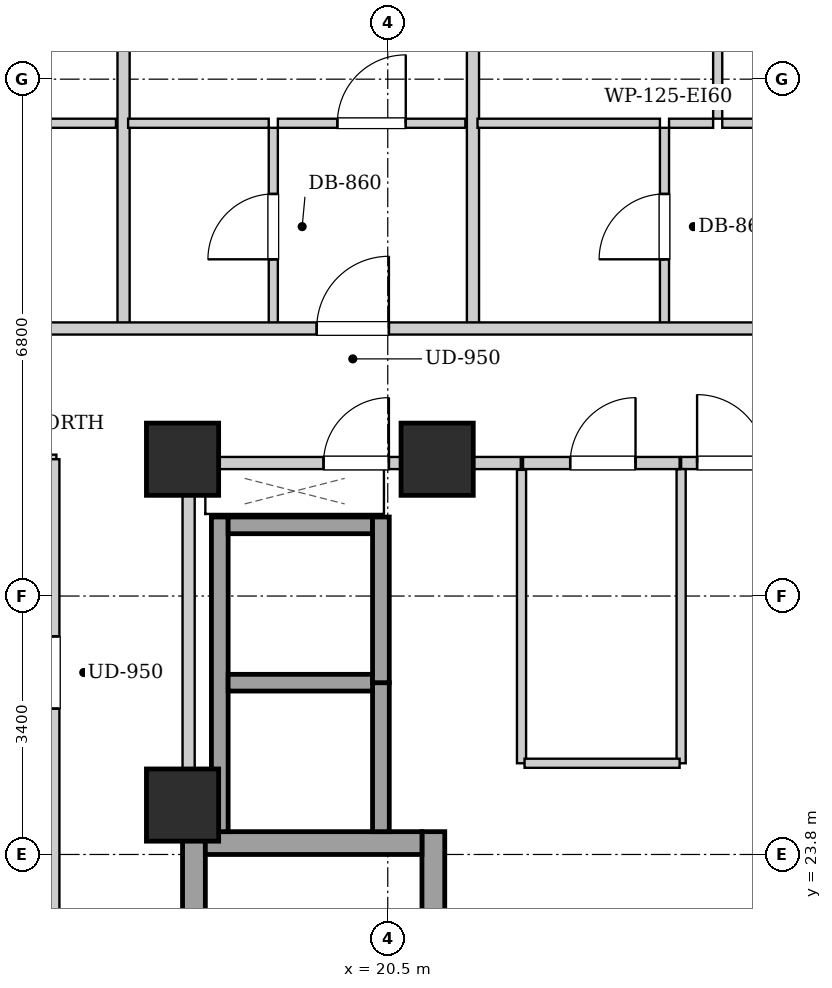
"""IFC4 building model, lengths in metres.
Left out: names, types, materials, properties, quantities, classifications, styles, units other than length and angle.
Written with IfcOpenShell. Run it as: python <this file> out.ifc"""

import sys

from ifc_helpers import new_model, si_unit, direction, frame, frame_2d, origin, origin_2d, place, context, subcontext, project, spatial, rectangle, extrude, element, fill, save


model = new_model("IFC4")
c1 = context("Model", 3, precision=1e-05, world=origin(), true_north=direction((0.0, 1.0)))
c2 = subcontext(c1, "Body", "Model", "MODEL_VIEW")
j1 = project(units=[si_unit("LENGTHUNIT", "METRE"), si_unit("PLANEANGLEUNIT", "RADIAN")], contexts=[c1])
p1 = place(None, origin())
s1 = spatial("IfcSite", under=j1, at=p1, CompositionType="ELEMENT")
p2 = place(p1, origin())
s2 = spatial("IfcBuilding", under=s1, at=p2, CompositionType="ELEMENT")
p3 = place(p2, frame((0.0, 0.0, 147.15)))
s3 = spatial("IfcBuildingStorey", under=s2, at=p3, CompositionType="ELEMENT", Elevation=147.15)
for number, where, z_axis, x_axis in (
    (1, (17.8, 29.0, 0.0), (0.0, 0.0, 1.0), (1.0, 0.0, 0.0)),
    (2, (21.15, 29.0, 0.0), (0.0, 0.0, 1.0), (1.0, 0.0, 0.0)),
    (3, (17.8, 24.45, 0.0), (0.0, 0.0, 1.0), (1.0, 0.0, 0.0)),
):
    element("IfcColumn", number, at=place(p3, frame(where, z_axis=z_axis, x_axis=x_axis)), inside=s3, PredefinedType="COLUMN", context=c2, shape_type="SweptSolid", body=[
        extrude(rectangle(XDim=0.95, YDim=0.95, at=origin_2d()), origin(), (0.0, 0.0, 1.0), 3.25),
    ])
for number, where, z_axis, x_axis in (
    (4, (17.95, 15.1, 0.0), (0.0, 0.0, 1.0), (0.0, 1.0, 0.0)),
    (5, (21.1, 15.1, 0.0), (0.0, 0.0, 1.0), (0.0, 1.0, 0.0)),
):
    element("IfcWall", number, at=place(p3, frame(where, z_axis=z_axis, x_axis=x_axis)), inside=s3, PredefinedType="SHEAR", context=c2, shape_type="SweptSolid", body=[
        extrude(rectangle(XDim=9.0, YDim=0.3, at=frame_2d((4.5, 0.0))), origin(), (0.0, 0.0, 1.0), 2.99),
    ])
p4 = place(p3, frame((18.1, 23.95, 0.0), z_axis=(0.0, 0.0, 1.0), x_axis=(1.0, 0.0, 0.0)))
e6 = element("IfcWall", 6, at=p4, inside=s3, PredefinedType="SHEAR", context=c2, shape_type="SweptSolid", body=[
    extrude(rectangle(XDim=2.85, YDim=0.3, at=frame_2d((1.425, 0.0))), origin(), (0.0, 0.0, 1.0), 2.99),
])
p5 = place(p3, frame((18.29, 24.1, 0.0), z_axis=(0.0, 0.0, 1.0), x_axis=(0.0, 1.0, 0.0)))
e7 = element("IfcWall", 7, at=p5, inside=s3, PredefinedType="SHEAR", context=c2, shape_type="SweptSolid", body=[
    extrude(rectangle(XDim=4.14, YDim=0.22, at=frame_2d((2.07, 0.0))), origin(), (0.0, 0.0, 1.0), 2.99),
])
p6 = place(p3, frame((20.41, 24.1, 0.0), z_axis=(0.0, 0.0, 1.0), x_axis=(0.0, 1.0, 0.0)))
e8 = element("IfcWall", 8, at=p6, inside=s3, PredefinedType="SHEAR", context=c2, shape_type="SweptSolid", body=[
    extrude(rectangle(XDim=1.96, YDim=0.22, at=frame_2d((0.98, 0.0))), origin(), (0.0, 0.0, 1.0), 2.99),
])
for number, where, z_axis, x_axis in (
    (9, (18.4, 26.06, 0.0), (0.0, 0.0, 1.0), (1.0, 0.0, 0.0)),
    (10, (18.4, 28.13, 0.0), (0.0, 0.0, 1.0), (1.0, 0.0, 0.0)),
):
    element("IfcWall", number, at=place(p3, frame(where, z_axis=z_axis, x_axis=x_axis)), inside=s3, PredefinedType="SHEAR", context=c2, shape_type="SweptSolid", body=[
        extrude(rectangle(XDim=1.9, YDim=0.22, at=frame_2d((0.95, 0.0))), origin(), (0.0, 0.0, 1.0), 2.99),
    ])
p7 = place(p3, frame((20.41, 26.06, 0.0), z_axis=(0.0, 0.0, 1.0), x_axis=(0.0, 1.0, 0.0)))
e11 = element("IfcWall", 11, at=p7, inside=s3, PredefinedType="SHEAR", context=c2, shape_type="SweptSolid", body=[
    extrude(rectangle(XDim=2.18, YDim=0.22, at=frame_2d((1.09, 0.0))), origin(), (0.0, 0.0, 1.0), 2.99),
])
p8 = place(p3, frame((17.88, 24.12, 0.0), z_axis=(0.0, 0.0, 1.0), x_axis=(0.0, 1.0, 0.0)))
e12 = element("IfcWall", 12, at=p8, inside=s3, PredefinedType="PARTITIONING", context=c2, shape_type="SweptSolid", body=[
    extrude(rectangle(XDim=4.76, YDim=0.16, at=frame_2d((2.38, 0.0))), origin(), (0.0, 0.0, 1.0), 2.325),
])
p9 = place(p3, frame((24.36, 28.95, 0.0), z_axis=(0.0, 0.0, 1.0), x_axis=(1.0, 0.0, 0.0)))
e13 = element("IfcWall", 13, at=p9, inside=s3, PredefinedType="PARTITIONING", context=c2, shape_type="SweptSolid", body=[
    extrude(rectangle(XDim=1.32, YDim=0.16, at=frame_2d((0.66, 0.0))), origin(), (0.0, 0.0, 1.0), 2.442),
])
p10 = place(p9, frame((0.21, 0.0, 0.0)))
e14 = element("IfcOpeningElement", 14, at=p10, cuts=e13, PredefinedType="OPENING", context=c2, shape_type="SweptSolid", body=[
    extrude(rectangle(XDim=0.9, YDim=2.05, at=frame_2d((0.45, 1.025))), frame((0.0, 0.09, 0.0), z_axis=(0.0, -1.0, 0.0), x_axis=(1.0, 0.0, 0.0)), (0.0, 0.0, 1.0), 0.18),
])
p11 = place(p3, frame((17.96, 28.95, 0.0), z_axis=(0.0, 0.0, 1.0), x_axis=(1.0, 0.0, 0.0)))
e15 = element("IfcWall", 15, at=p11, inside=s3, PredefinedType="PARTITIONING", context=c2, shape_type="SweptSolid", body=[
    extrude(rectangle(XDim=4.29, YDim=0.16, at=frame_2d((2.145, 0.0))), origin(), (0.0, 0.0, 1.0), 2.442),
])
p12 = place(p11, frame((1.695, 0.0, 0.0)))
e16 = element("IfcOpeningElement", 16, at=p12, cuts=e15, PredefinedType="OPENING", context=c2, shape_type="SweptSolid", body=[
    extrude(rectangle(XDim=0.86, YDim=2.05, at=frame_2d((0.43, 1.025))), frame((0.0, 0.09, 0.0), z_axis=(0.0, -1.0, 0.0), x_axis=(1.0, 0.0, 0.0)), (0.0, 0.0, 1.0), 0.18),
])
p13 = place(p3, frame((24.36, 25.0, 0.0), z_axis=(0.0, 0.0, 1.0), x_axis=(0.0, 1.0, 0.0)))
e17 = element("IfcWall", 17, at=p13, inside=s3, PredefinedType="PARTITIONING", context=c2, shape_type="SweptSolid", body=[
    extrude(rectangle(XDim=3.87, YDim=0.12, at=frame_2d((1.935, 0.0))), origin(), (0.0, 0.0, 1.0), 2.99),
])
p14 = place(p3, frame((22.26, 25.0, 0.0), z_axis=(0.0, 0.0, 1.0), x_axis=(0.0, 1.0, 0.0)))
e18 = element("IfcWall", 18, at=p14, inside=s3, PredefinedType="PARTITIONING", context=c2, shape_type="SweptSolid", body=[
    extrude(rectangle(XDim=3.86, YDim=0.12, at=frame_2d((1.93, 0.0))), origin(), (0.0, 0.0, 1.0), 2.99),
])
p15 = place(p3, frame((22.3, 25.0, 0.0), z_axis=(0.0, 0.0, 1.0), x_axis=(1.0, 0.0, 0.0)))
e19 = element("IfcWall", 19, at=p15, inside=s3, PredefinedType="PARTITIONING", context=c2, shape_type="SweptSolid", body=[
    extrude(rectangle(XDim=2.04, YDim=0.12, at=frame_2d((1.02, 0.0))), origin(), (0.0, 0.0, 1.0), 2.99),
])
p16 = place(p3, frame((22.28, 28.95, 0.0), z_axis=(0.0, 0.0, 1.0), x_axis=(1.0, 0.0, 0.0)))
e20 = element("IfcWall", 20, at=p16, inside=s3, PredefinedType="PARTITIONING", context=c2, shape_type="SweptSolid", body=[
    extrude(rectangle(XDim=2.06, YDim=0.16, at=frame_2d((1.03, 0.0))), origin(), (0.0, 0.0, 1.0), 2.442),
])
p17 = place(p16, frame((0.62, 0.0, 0.0)))
e21 = element("IfcOpeningElement", 21, at=p17, cuts=e20, PredefinedType="OPENING", context=c2, shape_type="SweptSolid", body=[
    extrude(rectangle(XDim=0.86, YDim=2.05, at=frame_2d((0.43, 1.025))), frame((0.0, 0.09, 0.0), z_axis=(0.0, -1.0, 0.0), x_axis=(1.0, 0.0, 0.0)), (0.0, 0.0, 1.0), 0.18),
])
p18 = place(p3, frame((7.78, 28.98, 0.0), z_axis=(0.0, 0.0, 1.0), x_axis=(1.0, 0.0, 0.0)))
e22 = element("IfcWall", 22, at=p18, inside=s3, PredefinedType="PARTITIONING", context=c2, shape_type="SweptSolid", body=[
    extrude(rectangle(XDim=8.36, YDim=0.16, at=frame_2d((4.18, 0.0))), origin(), (0.0, 0.0, 1.0), 2.442),
])
p19 = place(p3, frame((12.253, 33.42, 0.0), z_axis=(0.0, 0.0, 1.0), x_axis=(1.0, 0.0, 0.0)))
e23 = element("IfcWall", 23, at=p19, inside=s3, PredefinedType="PARTITIONING", context=c2, shape_type="SweptSolid", body=[
    extrude(rectangle(XDim=4.671, YDim=0.12, at=frame_2d((2.335, 0.0))), origin(), (0.0, 0.0, 1.0), 2.99),
])
p20 = place(p19, frame((1.885, 0.0, 0.0)))
e24 = element("IfcOpeningElement", 24, at=p20, cuts=e23, PredefinedType="OPENING", context=c2, shape_type="SweptSolid", body=[
    extrude(rectangle(XDim=0.9, YDim=2.05, at=frame_2d((0.45, 1.025))), frame((0.0, 0.07, 0.0), z_axis=(0.0, -1.0, 0.0), x_axis=(1.0, 0.0, 0.0)), (0.0, 0.0, 1.0), 0.14),
])
p21 = place(p3, frame((17.024, 30.76, 0.0), z_axis=(0.0, 0.0, 1.0), x_axis=(0.0, 1.0, 0.0)))
e25 = element("IfcWall", 25, at=p21, inside=s3, PredefinedType="PARTITIONING", context=c2, shape_type="SweptSolid", body=[
    extrude(rectangle(XDim=12.26, YDim=0.16, at=frame_2d((6.13, 0.0))), origin(), (0.0, 0.0, 1.0), 2.99),
])
p22 = place(p3, frame((18.994, 30.76, 0.0), z_axis=(0.0, 0.0, 1.0), x_axis=(0.0, 1.0, 0.0)))
e26 = element("IfcWall", 26, at=p22, inside=s3, PredefinedType="PARTITIONING", context=c2, shape_type="SweptSolid", body=[
    extrude(rectangle(XDim=2.6, YDim=0.12, at=frame_2d((1.3, 0.0))), origin(), (0.0, 0.0, 1.0), 2.99),
])
p23 = place(p22, frame((0.87, 0.0, 0.0)))
e27 = element("IfcOpeningElement", 27, at=p23, cuts=e26, PredefinedType="OPENING", context=c2, shape_type="SweptSolid", body=[
    extrude(rectangle(XDim=0.86, YDim=2.05, at=frame_2d((0.43, 1.025))), frame((0.0, 0.07, 0.0), z_axis=(0.0, -1.0, 0.0), x_axis=(1.0, 0.0, 0.0)), (0.0, 0.0, 1.0), 0.14),
])
p24 = place(p3, frame((17.084, 33.42, 0.0), z_axis=(0.0, 0.0, 1.0), x_axis=(1.0, 0.0, 0.0)))
e28 = element("IfcWall", 28, at=p24, inside=s3, PredefinedType="PARTITIONING", context=c2, shape_type="SweptSolid", body=[
    extrude(rectangle(XDim=1.85, YDim=0.12, at=frame_2d((0.925, 0.0))), origin(), (0.0, 0.0, 1.0), 2.99),
])
p25 = place(p3, frame((19.054, 33.42, 0.0), z_axis=(0.0, 0.0, 1.0), x_axis=(1.0, 0.0, 0.0)))
e29 = element("IfcWall", 29, at=p25, inside=s3, PredefinedType="PARTITIONING", context=c2, shape_type="SweptSolid", body=[
    extrude(rectangle(XDim=2.467, YDim=0.12, at=frame_2d((1.233, 0.0))), origin(), (0.0, 0.0, 1.0), 2.99),
])
p26 = place(p25, frame((0.783, 0.0, 0.0)))
e30 = element("IfcOpeningElement", 30, at=p26, cuts=e29, PredefinedType="OPENING", context=c2, shape_type="SweptSolid", body=[
    extrude(rectangle(XDim=0.9, YDim=2.05, at=frame_2d((0.45, 1.025))), frame((0.0, 0.07, 0.0), z_axis=(0.0, -1.0, 0.0), x_axis=(1.0, 0.0, 0.0)), (0.0, 0.0, 1.0), 0.14),
])
p27 = place(p3, frame((21.621, 30.76, 0.0), z_axis=(0.0, 0.0, 1.0), x_axis=(0.0, 1.0, 0.0)))
e31 = element("IfcWall", 31, at=p27, inside=s3, PredefinedType="PARTITIONING", context=c2, shape_type="SweptSolid", body=[
    extrude(rectangle(XDim=12.26, YDim=0.16, at=frame_2d((6.13, 0.0))), origin(), (0.0, 0.0, 1.0), 2.99),
])
p28 = place(p3, frame((24.141, 30.76, 0.0), z_axis=(0.0, 0.0, 1.0), x_axis=(0.0, 1.0, 0.0)))
e32 = element("IfcWall", 32, at=p28, inside=s3, PredefinedType="PARTITIONING", context=c2, shape_type="SweptSolid", body=[
    extrude(rectangle(XDim=2.6, YDim=0.12, at=frame_2d((1.3, 0.0))), origin(), (0.0, 0.0, 1.0), 2.99),
])
p29 = place(p28, frame((0.87, 0.0, 0.0)))
e33 = element("IfcOpeningElement", 33, at=p29, cuts=e32, PredefinedType="OPENING", context=c2, shape_type="SweptSolid", body=[
    extrude(rectangle(XDim=0.86, YDim=2.05, at=frame_2d((0.43, 1.025))), frame((0.0, 0.07, 0.0), z_axis=(0.0, -1.0, 0.0), x_axis=(1.0, 0.0, 0.0)), (0.0, 0.0, 1.0), 0.14),
])
p30 = place(p3, frame((21.681, 33.42, 0.0), z_axis=(0.0, 0.0, 1.0), x_axis=(1.0, 0.0, 0.0)))
e34 = element("IfcWall", 34, at=p30, inside=s3, PredefinedType="PARTITIONING", context=c2, shape_type="SweptSolid", body=[
    extrude(rectangle(XDim=2.4, YDim=0.12, at=frame_2d((1.2, 0.0))), origin(), (0.0, 0.0, 1.0), 2.99),
])
p31 = place(p3, frame((24.201, 33.42, 0.0), z_axis=(0.0, 0.0, 1.0), x_axis=(1.0, 0.0, 0.0)))
e35 = element("IfcWall", 35, at=p31, inside=s3, PredefinedType="PARTITIONING", context=c2, shape_type="SweptSolid", body=[
    extrude(rectangle(XDim=0.58, YDim=0.12, at=frame_2d((0.29, 0.0))), origin(), (0.0, 0.0, 1.0), 2.99),
])
p32 = place(p3, frame((24.901, 33.42, 0.0), z_axis=(0.0, 0.0, 1.0), x_axis=(1.0, 0.0, 0.0)))
e36 = element("IfcWall", 36, at=p32, inside=s3, PredefinedType="PARTITIONING", context=c2, shape_type="SweptSolid", body=[
    extrude(rectangle(XDim=3.74, YDim=0.12, at=frame_2d((1.87, 0.0))), origin(), (0.0, 0.0, 1.0), 2.99),
])
p33 = place(p32, frame((1.42, 0.0, 0.0)))
e37 = element("IfcOpeningElement", 37, at=p33, cuts=e36, PredefinedType="OPENING", context=c2, shape_type="SweptSolid", body=[
    extrude(rectangle(XDim=0.9, YDim=2.05, at=frame_2d((0.45, 1.025))), frame((0.0, 0.07, 0.0), z_axis=(0.0, -1.0, 0.0), x_axis=(1.0, 0.0, 0.0)), (0.0, 0.0, 1.0), 0.14),
])
p34 = place(p3, frame((24.841, 33.48, 0.0), z_axis=(0.0, 0.0, 1.0), x_axis=(0.0, 1.0, 0.0)))
e38 = element("IfcWall", 38, at=p34, inside=s3, PredefinedType="PARTITIONING", context=c2, shape_type="SweptSolid", body=[
    extrude(rectangle(XDim=9.54, YDim=0.12, at=frame_2d((4.77, 0.0))), origin(), (0.0, 0.0, 1.0), 2.99),
])
p35 = place(p34, frame((4.305, 0.0, 0.0)))
e39 = element("IfcOpeningElement", 39, at=p35, cuts=e38, PredefinedType="OPENING", context=c2, shape_type="SweptSolid", body=[
    extrude(rectangle(XDim=0.9, YDim=2.05, at=frame_2d((0.45, 1.025))), frame((0.0, 0.07, 0.0), z_axis=(0.0, -1.0, 0.0), x_axis=(1.0, 0.0, 0.0)), (0.0, 0.0, 1.0), 0.14),
])
p36 = place(p3, frame((10.05, 30.72, 0.0), z_axis=(0.0, 0.0, 1.0), x_axis=(1.0, 0.0, 0.0)))
e40 = element("IfcWall", 40, at=p36, inside=s3, PredefinedType="PARTITIONING", context=c2, shape_type="SweptSolid", body=[
    extrude(rectangle(XDim=27.7, YDim=0.16, at=frame_2d((13.85, 0.0))), origin(), (0.0, 0.0, 1.0), 2.99),
])
p37 = place(p36, frame((4.063, 0.0, 0.0)))
e41 = element("IfcOpeningElement", 41, at=p37, cuts=e40, PredefinedType="OPENING", context=c2, shape_type="SweptSolid", body=[
    extrude(rectangle(XDim=0.95, YDim=2.1, at=frame_2d((0.475, 1.05))), frame((0.0, 0.09, 0.0), z_axis=(0.0, -1.0, 0.0), x_axis=(1.0, 0.0, 0.0)), (0.0, 0.0, 1.0), 0.18),
])
p38 = place(p36, frame((9.515, 0.0, 0.0)))
e42 = element("IfcOpeningElement", 42, at=p38, cuts=e40, PredefinedType="OPENING", context=c2, shape_type="SweptSolid", body=[
    extrude(rectangle(XDim=0.95, YDim=2.1, at=frame_2d((0.475, 1.05))), frame((0.0, 0.09, 0.0), z_axis=(0.0, -1.0, 0.0), x_axis=(1.0, 0.0, 0.0)), (0.0, 0.0, 1.0), 0.18),
])
p39 = place(p36, frame((15.896, 0.0, 0.0)))
e43 = element("IfcOpeningElement", 43, at=p39, cuts=e40, PredefinedType="OPENING", context=c2, shape_type="SweptSolid", body=[
    extrude(rectangle(XDim=0.95, YDim=2.1, at=frame_2d((0.475, 1.05))), frame((0.0, 0.09, 0.0), z_axis=(0.0, -1.0, 0.0), x_axis=(1.0, 0.0, 0.0)), (0.0, 0.0, 1.0), 0.18),
])
p40 = place(p36, frame((25.925, 0.0, 0.0)))
e44 = element("IfcOpeningElement", 44, at=p40, cuts=e40, PredefinedType="OPENING", context=c2, shape_type="SweptSolid", body=[
    extrude(rectangle(XDim=0.95, YDim=2.1, at=frame_2d((0.475, 1.05))), frame((0.0, 0.09, 0.0), z_axis=(0.0, -1.0, 0.0), x_axis=(1.0, 0.0, 0.0)), (0.0, 0.0, 1.0), 0.18),
])
p41 = place(p3, frame((16.1, 15.07, 0.0), z_axis=(0.0, 0.0, 1.0), x_axis=(0.0, 1.0, 0.0)))
e45 = element("IfcWall", 45, at=p41, inside=s3, PredefinedType="PARTITIONING", context=c2, shape_type="SweptSolid", body=[
    extrude(rectangle(XDim=13.93, YDim=0.16, at=frame_2d((6.965, 0.0))), origin(), (0.0, 0.0, 1.0), 2.99),
])
p42 = place(p41, frame((3.608, 0.0, 0.0)))
e46 = element("IfcOpeningElement", 46, at=p42, cuts=e45, PredefinedType="OPENING", context=c2, shape_type="SweptSolid", body=[
    extrude(rectangle(XDim=0.95, YDim=2.1, at=frame_2d((0.475, 1.05))), frame((0.0, 0.09, 0.0), z_axis=(0.0, -1.0, 0.0), x_axis=(1.0, 0.0, 0.0)), (0.0, 0.0, 1.0), 0.18),
])
p43 = place(p41, frame((10.649, 0.0, 0.0)))
e47 = element("IfcOpeningElement", 47, at=p43, cuts=e45, PredefinedType="OPENING", context=c2, shape_type="SweptSolid", body=[
    extrude(rectangle(XDim=0.95, YDim=2.1, at=frame_2d((0.475, 1.05))), frame((0.0, 0.09, 0.0), z_axis=(0.0, -1.0, 0.0), x_axis=(1.0, 0.0, 0.0)), (0.0, 0.0, 1.0), 0.18),
])
p44 = place(p10, origin())
e48 = element("IfcDoor", 48, at=p44, inside=s3, OperationType="SINGLE_SWING_LEFT", PredefinedType="DOOR", context=c2, shape_type="SweptSolid", body=[
    extrude(rectangle(XDim=0.9, YDim=2.05, at=frame_2d((0.45, 1.025))), frame((0.0, 0.025, 0.0), z_axis=(0.0, -1.0, 0.0), x_axis=(1.0, 0.0, 0.0)), (0.0, 0.0, 1.0), 0.05),
])
fill(e14, e48)
p45 = place(p12, origin())
e49 = element("IfcDoor", 49, at=p45, inside=s3, OperationType="SINGLE_SWING_RIGHT", PredefinedType="DOOR", context=c2, shape_type="SweptSolid", body=[
    extrude(rectangle(XDim=0.86, YDim=2.05, at=frame_2d((0.43, 1.025))), frame((0.0, 0.025, 0.0), z_axis=(0.0, -1.0, 0.0), x_axis=(1.0, 0.0, 0.0)), (0.0, 0.0, 1.0), 0.05),
])
fill(e16, e49)
p46 = place(p17, origin())
e50 = element("IfcDoor", 50, at=p46, inside=s3, OperationType="SINGLE_SWING_RIGHT", PredefinedType="DOOR", context=c2, shape_type="SweptSolid", body=[
    extrude(rectangle(XDim=0.86, YDim=2.05, at=frame_2d((0.43, 1.025))), frame((0.0, 0.025, 0.0), z_axis=(0.0, -1.0, 0.0), x_axis=(1.0, 0.0, 0.0)), (0.0, 0.0, 1.0), 0.05),
])
fill(e21, e50)
p47 = place(p23, origin())
e51 = element("IfcDoor", 51, at=p47, inside=s3, OperationType="SINGLE_SWING_LEFT", PredefinedType="DOOR", context=c2, shape_type="SweptSolid", body=[
    extrude(rectangle(XDim=0.86, YDim=2.05, at=frame_2d((0.43, 1.025))), frame((0.0, 0.025, 0.0), z_axis=(0.0, -1.0, 0.0), x_axis=(1.0, 0.0, 0.0)), (0.0, 0.0, 1.0), 0.05),
])
fill(e27, e51)
p48 = place(p26, origin())
e52 = element("IfcDoor", 52, at=p48, inside=s3, OperationType="SINGLE_SWING_RIGHT", PredefinedType="DOOR", context=c2, shape_type="SweptSolid", body=[
    extrude(rectangle(XDim=0.9, YDim=2.05, at=frame_2d((0.45, 1.025))), frame((0.0, 0.025, 0.0), z_axis=(0.0, -1.0, 0.0), x_axis=(1.0, 0.0, 0.0)), (0.0, 0.0, 1.0), 0.05),
])
fill(e30, e52)
p49 = place(p29, origin())
e53 = element("IfcDoor", 53, at=p49, inside=s3, OperationType="SINGLE_SWING_LEFT", PredefinedType="DOOR", context=c2, shape_type="SweptSolid", body=[
    extrude(rectangle(XDim=0.86, YDim=2.05, at=frame_2d((0.43, 1.025))), frame((0.0, 0.025, 0.0), z_axis=(0.0, -1.0, 0.0), x_axis=(1.0, 0.0, 0.0)), (0.0, 0.0, 1.0), 0.05),
])
fill(e33, e53)
p50 = place(p38, origin())
e54 = element("IfcDoor", 54, at=p50, inside=s3, OperationType="SINGLE_SWING_RIGHT", PredefinedType="DOOR", context=c2, shape_type="SweptSolid", body=[
    extrude(rectangle(XDim=0.95, YDim=2.1, at=frame_2d((0.475, 1.05))), frame((0.0, 0.025, 0.0), z_axis=(0.0, -1.0, 0.0), x_axis=(1.0, 0.0, 0.0)), (0.0, 0.0, 1.0), 0.05),
])
fill(e42, e54)
p51 = place(p43, origin())
e55 = element("IfcDoor", 55, at=p51, inside=s3, OperationType="SINGLE_SWING_RIGHT", PredefinedType="DOOR", context=c2, shape_type="SweptSolid", body=[
    extrude(rectangle(XDim=0.95, YDim=2.1, at=frame_2d((0.475, 1.05))), frame((0.0, 0.025, 0.0), z_axis=(0.0, -1.0, 0.0), x_axis=(1.0, 0.0, 0.0)), (0.0, 0.0, 1.0), 0.05),
])
fill(e47, e55)
save(model, sys.argv[1])
